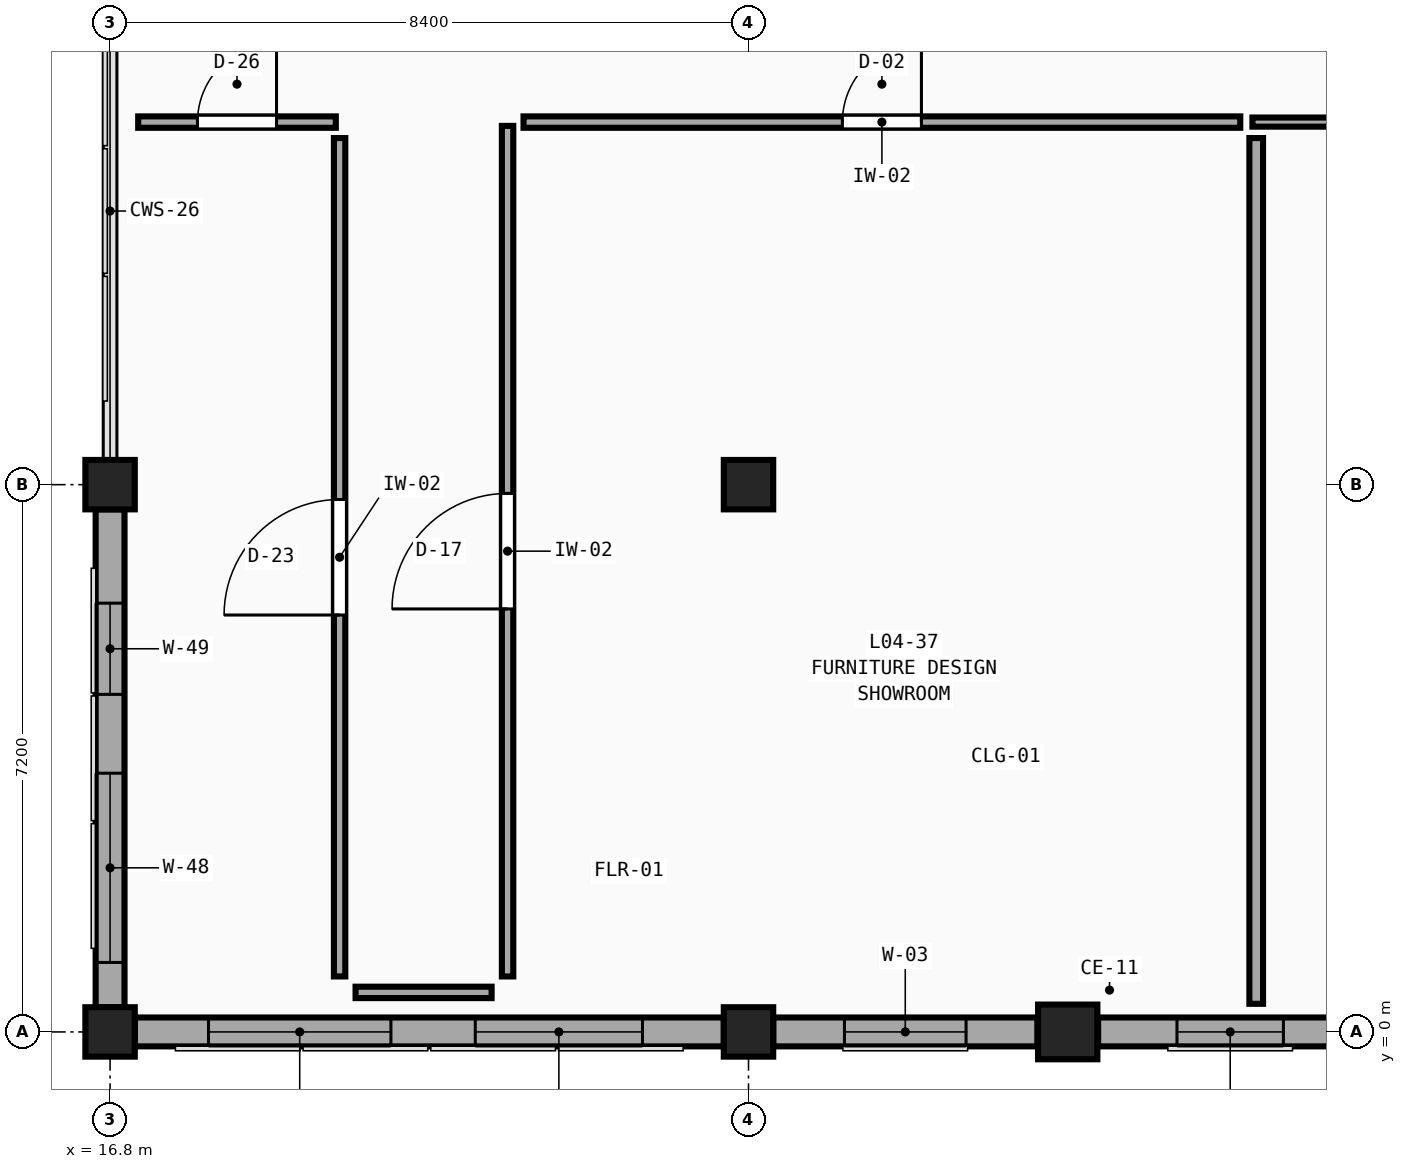
"""IFC4 building model, lengths in metres.
Left out: names, types, materials, properties, quantities, classifications, styles, units other than length and angle.
Written with IfcOpenShell. Run it as: python <this file> out.ifc"""

import sys

from ifc_helpers import new_model, si_unit, direction, frame, frame_2d, origin, origin_2d, place, context, subcontext, project, spatial, rectangle, extrude, element, fill, save


model = new_model("IFC4")
c1 = context("Model", 3, precision=1e-05, world=origin(), true_north=direction((0.0, 1.0)))
c2 = subcontext(c1, "Body", "Model", "MODEL_VIEW")
j1 = project(units=[si_unit("LENGTHUNIT", "METRE"), si_unit("PLANEANGLEUNIT", "RADIAN")], contexts=[c1])
p1 = place(None, origin())
s1 = spatial("IfcSite", under=j1, at=p1, CompositionType="ELEMENT")
p2 = place(p1, origin())
s2 = spatial("IfcBuilding", under=s1, at=p2, CompositionType="ELEMENT")
p3 = place(p2, frame((0.0, 0.0, 18.9)))
s3 = spatial("IfcBuildingStorey", under=s2, at=p3, CompositionType="ELEMENT", Elevation=18.9)
for number, where, z_axis, x_axis in (
    (1, (16.8, 0.0, 0.0), (0.0, 0.0, 1.0), (1.0, 0.0, 0.0)),
    (2, (16.8, 7.2, 0.0), (0.0, 0.0, 1.0), (1.0, 0.0, 0.0)),
    (3, (25.2, 0.0, 0.0), (0.0, 0.0, 1.0), (1.0, 0.0, 0.0)),
    (4, (25.2, 7.2, 0.0), (0.0, 0.0, 1.0), (1.0, 0.0, 0.0)),
):
    element("IfcColumn", number, at=place(p3, frame(where, z_axis=z_axis, x_axis=x_axis)), inside=s3, PredefinedType="COLUMN", context=c2, shape_type="SweptSolid", body=[
        extrude(rectangle(XDim=0.65, YDim=0.65, at=origin_2d()), origin(), (0.0, 0.0, 1.0), 4.5),
    ])
p4 = place(p3, frame((29.4, 0.0, 0.0), z_axis=(0.0, 0.0, 1.0), x_axis=(1.0, 0.0, 0.0)))
e5 = element("IfcColumn", 5, at=p4, inside=s3, PredefinedType="PILASTER", context=c2, shape_type="SweptSolid", body=[
    extrude(rectangle(XDim=0.78, YDim=0.72, at=origin_2d()), origin(), (0.0, 0.0, 1.0), 4.5),
])
p5 = place(p3, frame((24.875, 0.0, 0.0), z_axis=(0.0, 0.0, 1.0), x_axis=(-1.0, 0.0, 0.0)))
e6 = element("IfcWall", 6, at=p5, inside=s3, PredefinedType="SOLIDWALL", context=c2, shape_type="SweptSolid", body=[
    extrude(rectangle(XDim=7.75, YDim=0.38, at=frame_2d((3.875, 0.0))), origin(), (0.0, 0.0, 1.0), 3.63),
])
p6 = place(p5, frame((1.07, 0.0, 0.75)))
e7 = element("IfcOpeningElement", 7, at=p6, cuts=e6, PredefinedType="OPENING", context=c2, shape_type="SweptSolid", body=[
    extrude(rectangle(XDim=2.2, YDim=2.73, at=frame_2d((1.1, 1.365))), frame((0.0, 0.21, 0.0), z_axis=(0.0, -1.0, 0.0), x_axis=(1.0, 0.0, 0.0)), (0.0, 0.0, 1.0), 0.42),
])
p7 = place(p5, frame((4.38, 0.0, 0.75)))
e8 = element("IfcOpeningElement", 8, at=p7, cuts=e6, PredefinedType="OPENING", context=c2, shape_type="SweptSolid", body=[
    extrude(rectangle(XDim=2.4, YDim=2.73, at=frame_2d((1.2, 1.365))), frame((0.0, 0.21, 0.0), z_axis=(0.0, -1.0, 0.0), x_axis=(1.0, 0.0, 0.0)), (0.0, 0.0, 1.0), 0.42),
])
p8 = place(p3, frame((16.8, 0.325, 0.0), z_axis=(0.0, 0.0, 1.0), x_axis=(0.0, 1.0, 0.0)))
e9 = element("IfcWall", 9, at=p8, inside=s3, PredefinedType="SOLIDWALL", context=c2, shape_type="SweptSolid", body=[
    extrude(rectangle(XDim=6.55, YDim=0.38, at=frame_2d((3.275, 0.0))), origin(), (0.0, 0.0, 1.0), 3.63),
])
p9 = place(p8, frame((0.589, 0.0, 0.75)))
e10 = element("IfcOpeningElement", 10, at=p9, cuts=e9, PredefinedType="OPENING", context=c2, shape_type="SweptSolid", body=[
    extrude(rectangle(XDim=2.49, YDim=2.73, at=frame_2d((1.245, 1.365))), frame((0.0, 0.21, 0.0), z_axis=(0.0, -1.0, 0.0), x_axis=(1.0, 0.0, 0.0)), (0.0, 0.0, 1.0), 0.42),
])
p10 = place(p8, frame((4.116, 0.0, 0.75)))
e11 = element("IfcOpeningElement", 11, at=p10, cuts=e9, PredefinedType="OPENING", context=c2, shape_type="SweptSolid", body=[
    extrude(rectangle(XDim=1.2, YDim=2.73, at=frame_2d((0.6, 1.365))), frame((0.0, 0.21, 0.0), z_axis=(0.0, -1.0, 0.0), x_axis=(1.0, 0.0, 0.0)), (0.0, 0.0, 1.0), 0.42),
])
p11 = place(p3, frame((33.275, 0.0, 0.0), z_axis=(0.0, 0.0, 1.0), x_axis=(-1.0, 0.0, 0.0)))
e12 = element("IfcWall", 12, at=p11, inside=s3, PredefinedType="SOLIDWALL", context=c2, shape_type="SweptSolid", body=[
    extrude(rectangle(XDim=3.475, YDim=0.38, at=frame_2d((1.737, 0.0))), origin(), (0.0, 0.0, 1.0), 3.63),
])
p12 = place(p11, frame((1.038, 0.0, 0.75)))
e13 = element("IfcOpeningElement", 13, at=p12, cuts=e12, PredefinedType="OPENING", context=c2, shape_type="SweptSolid", body=[
    extrude(rectangle(XDim=1.4, YDim=1.9, at=frame_2d((0.7, 0.95))), frame((0.0, 0.21, 0.0), z_axis=(0.0, -1.0, 0.0), x_axis=(1.0, 0.0, 0.0)), (0.0, 0.0, 1.0), 0.42),
])
p13 = place(p3, frame((29.0, 0.0, 0.0), z_axis=(0.0, 0.0, 1.0), x_axis=(-1.0, 0.0, 0.0)))
e14 = element("IfcWall", 14, at=p13, inside=s3, PredefinedType="SOLIDWALL", context=c2, shape_type="SweptSolid", body=[
    extrude(rectangle(XDim=3.475, YDim=0.38, at=frame_2d((1.738, 0.0))), origin(), (0.0, 0.0, 1.0), 3.63),
])
p14 = place(p13, frame((0.938, 0.0, 0.75)))
e15 = element("IfcOpeningElement", 15, at=p14, cuts=e14, PredefinedType="OPENING", context=c2, shape_type="SweptSolid", body=[
    extrude(rectangle(XDim=1.6, YDim=1.9, at=frame_2d((0.8, 0.95))), frame((0.0, 0.21, 0.0), z_axis=(0.0, -1.0, 0.0), x_axis=(1.0, 0.0, 0.0)), (0.0, 0.0, 1.0), 0.42),
])
p15 = place(p3, frame((22.03, 0.73, 0.0), z_axis=(0.0, 0.0, 1.0), x_axis=(0.0, 1.0, 0.0)))
e16 = element("IfcWall", 16, at=p15, inside=s3, PredefinedType="PARTITIONING", context=c2, shape_type="SweptSolid", body=[
    extrude(rectangle(XDim=11.19, YDim=0.15, at=frame_2d((5.595, 0.0))), origin(), (0.0, 0.0, 1.0), 4.18),
])
p16 = place(p15, frame((4.835, 0.0, 0.0)))
e17 = element("IfcOpeningElement", 17, at=p16, cuts=e16, PredefinedType="OPENING", context=c2, shape_type="SweptSolid", body=[
    extrude(rectangle(XDim=1.52, YDim=2.21, at=frame_2d((0.76, 1.105))), frame((0.0, 0.095, 0.0), z_axis=(0.0, -1.0, 0.0), x_axis=(1.0, 0.0, 0.0)), (0.0, 0.0, 1.0), 0.19),
])
p17 = place(p3, frame((19.82, 0.73, 0.0), z_axis=(0.0, 0.0, 1.0), x_axis=(0.0, 1.0, 0.0)))
e18 = element("IfcWall", 18, at=p17, inside=s3, PredefinedType="PARTITIONING", context=c2, shape_type="SweptSolid", body=[
    extrude(rectangle(XDim=11.03, YDim=0.15, at=frame_2d((5.515, 0.0))), origin(), (0.0, 0.0, 1.0), 4.18),
])
p18 = place(p17, frame((4.755, 0.0, 0.0)))
e19 = element("IfcOpeningElement", 19, at=p18, cuts=e18, PredefinedType="OPENING", context=c2, shape_type="SweptSolid", body=[
    extrude(rectangle(XDim=1.52, YDim=2.29, at=frame_2d((0.76, 1.145))), frame((0.0, 0.095, 0.0), z_axis=(0.0, -1.0, 0.0), x_axis=(1.0, 0.0, 0.0)), (0.0, 0.0, 1.0), 0.19),
])
p19 = place(p3, frame((22.24, 11.97, 0.0), z_axis=(0.0, 0.0, 1.0), x_axis=(1.0, 0.0, 0.0)))
e20 = element("IfcWall", 20, at=p19, inside=s3, PredefinedType="PARTITIONING", context=c2, shape_type="SweptSolid", body=[
    extrude(rectangle(XDim=9.43, YDim=0.15, at=frame_2d((4.715, 0.0))), origin(), (0.0, 0.0, 1.0), 4.18),
])
p20 = place(p19, frame((4.195, 0.0, 0.0)))
e21 = element("IfcOpeningElement", 21, at=p20, cuts=e20, PredefinedType="OPENING", context=c2, shape_type="SweptSolid", body=[
    extrude(rectangle(XDim=1.04, YDim=2.05, at=frame_2d((0.52, 1.025))), frame((0.0, 0.095, 0.0), z_axis=(0.0, -1.0, 0.0), x_axis=(1.0, 0.0, 0.0)), (0.0, 0.0, 1.0), 0.19),
])
p21 = place(p3, frame((31.83, 11.97, 0.0), z_axis=(0.0, 0.0, 1.0), x_axis=(1.0, 0.0, 0.0)))
e22 = element("IfcWall", 22, at=p21, inside=s3, PredefinedType="PARTITIONING", context=c2, shape_type="SweptSolid", body=[
    extrude(rectangle(XDim=4.74, YDim=0.12, at=frame_2d((2.37, 0.0))), origin(), (0.0, 0.0, 1.0), 4.18),
])
p22 = place(p21, frame((1.77, 0.0, 0.0)))
e23 = element("IfcOpeningElement", 23, at=p22, cuts=e22, PredefinedType="OPENING", context=c2, shape_type="SweptSolid", body=[
    extrude(rectangle(XDim=1.2, YDim=2.13, at=frame_2d((0.6, 1.065))), frame((0.0, 0.08, 0.0), z_axis=(0.0, -1.0, 0.0), x_axis=(1.0, 0.0, 0.0)), (0.0, 0.0, 1.0), 0.16),
])
p23 = place(p3, frame((17.17, 11.97, 0.0), z_axis=(0.0, 0.0, 1.0), x_axis=(1.0, 0.0, 0.0)))
e24 = element("IfcWall", 24, at=p23, inside=s3, PredefinedType="PARTITIONING", context=c2, shape_type="SweptSolid", body=[
    extrude(rectangle(XDim=2.6, YDim=0.15, at=frame_2d((1.3, 0.0))), origin(), (0.0, 0.0, 1.0), 4.18),
])
p24 = place(p23, frame((0.78, 0.0, 0.0)))
e25 = element("IfcOpeningElement", 25, at=p24, cuts=e24, PredefinedType="OPENING", context=c2, shape_type="SweptSolid", body=[
    extrude(rectangle(XDim=1.04, YDim=2.37, at=frame_2d((0.52, 1.185))), frame((0.0, 0.095, 0.0), z_axis=(0.0, -1.0, 0.0), x_axis=(1.0, 0.0, 0.0)), (0.0, 0.0, 1.0), 0.19),
])
p25 = place(p3, frame((20.03, 0.52, 0.0), z_axis=(0.0, 0.0, 1.0), x_axis=(1.0, 0.0, 0.0)))
e26 = element("IfcWall", 26, at=p25, inside=s3, PredefinedType="PARTITIONING", context=c2, shape_type="SweptSolid", body=[
    extrude(rectangle(XDim=1.79, YDim=0.15, at=frame_2d((0.895, 0.0))), origin(), (0.0, 0.0, 1.0), 3.63),
])
p26 = place(p3, frame((31.88, 0.37, 0.0), z_axis=(0.0, 0.0, 1.0), x_axis=(0.0, 1.0, 0.0)))
e27 = element("IfcWall", 27, at=p26, inside=s3, PredefinedType="PARTITIONING", context=c2, shape_type="SweptSolid", body=[
    extrude(rectangle(XDim=11.39, YDim=0.18, at=frame_2d((5.695, 0.0))), origin(), (0.0, 0.0, 1.0), 4.18),
])
p27 = place(p6, origin())
e28 = element("IfcWindow", 28, at=p27, inside=s3, PartitioningType="TRIPLE_PANEL_VERTICAL", PredefinedType="WINDOW", context=c2, shape_type="SweptSolid", body=[
    extrude(rectangle(XDim=2.2, YDim=2.73, at=frame_2d((1.1, 1.365))), frame((0.0, 0.03, 0.0), z_axis=(0.0, -1.0, 0.0), x_axis=(1.0, 0.0, 0.0)), (0.0, 0.0, 1.0), 0.06),
])
fill(e7, e28)
p28 = place(p7, origin())
e29 = element("IfcWindow", 29, at=p28, inside=s3, PartitioningType="TRIPLE_PANEL_VERTICAL", PredefinedType="WINDOW", context=c2, shape_type="SweptSolid", body=[
    extrude(rectangle(XDim=2.4, YDim=2.73, at=frame_2d((1.2, 1.365))), frame((0.0, 0.03, 0.0), z_axis=(0.0, -1.0, 0.0), x_axis=(1.0, 0.0, 0.0)), (0.0, 0.0, 1.0), 0.06),
])
fill(e8, e29)
p29 = place(p9, origin())
e30 = element("IfcWindow", 30, at=p29, inside=s3, PartitioningType="TRIPLE_PANEL_VERTICAL", PredefinedType="WINDOW", context=c2, shape_type="SweptSolid", body=[
    extrude(rectangle(XDim=2.49, YDim=2.73, at=frame_2d((1.245, 1.365))), frame((0.0, 0.03, 0.0), z_axis=(0.0, -1.0, 0.0), x_axis=(1.0, 0.0, 0.0)), (0.0, 0.0, 1.0), 0.06),
])
fill(e10, e30)
p30 = place(p10, origin())
e31 = element("IfcWindow", 31, at=p30, inside=s3, PartitioningType="SINGLE_PANEL", PredefinedType="WINDOW", context=c2, shape_type="SweptSolid", body=[
    extrude(rectangle(XDim=1.2, YDim=2.73, at=frame_2d((0.6, 1.365))), frame((0.0, 0.03, 0.0), z_axis=(0.0, -1.0, 0.0), x_axis=(1.0, 0.0, 0.0)), (0.0, 0.0, 1.0), 0.06),
])
fill(e11, e31)
p31 = place(p12, origin())
e32 = element("IfcWindow", 32, at=p31, inside=s3, PartitioningType="DOUBLE_PANEL_VERTICAL", PredefinedType="WINDOW", context=c2, shape_type="SweptSolid", body=[
    extrude(rectangle(XDim=1.4, YDim=1.9, at=frame_2d((0.7, 0.95))), frame((0.0, 0.03, 0.0), z_axis=(0.0, -1.0, 0.0), x_axis=(1.0, 0.0, 0.0)), (0.0, 0.0, 1.0), 0.06),
])
fill(e13, e32)
p32 = place(p14, origin())
e33 = element("IfcWindow", 33, at=p32, inside=s3, PartitioningType="DOUBLE_PANEL_VERTICAL", PredefinedType="WINDOW", context=c2, shape_type="SweptSolid", body=[
    extrude(rectangle(XDim=1.6, YDim=1.9, at=frame_2d((0.8, 0.95))), frame((0.0, 0.03, 0.0), z_axis=(0.0, -1.0, 0.0), x_axis=(1.0, 0.0, 0.0)), (0.0, 0.0, 1.0), 0.06),
])
fill(e15, e33)
p33 = place(p16, origin())
e34 = element("IfcDoor", 34, at=p33, inside=s3, OperationType="SINGLE_SWING_LEFT", PredefinedType="DOOR", context=c2, shape_type="SweptSolid", body=[
    extrude(rectangle(XDim=1.52, YDim=2.21, at=frame_2d((0.76, 1.105))), frame((0.0, 0.025, 0.0), z_axis=(0.0, -1.0, 0.0), x_axis=(1.0, 0.0, 0.0)), (0.0, 0.0, 1.0), 0.05),
])
fill(e17, e34)
p34 = place(p18, origin())
e35 = element("IfcDoor", 35, at=p34, inside=s3, OperationType="SINGLE_SWING_LEFT", PredefinedType="DOOR", context=c2, shape_type="SweptSolid", body=[
    extrude(rectangle(XDim=1.52, YDim=2.29, at=frame_2d((0.76, 1.145))), frame((0.0, 0.025, 0.0), z_axis=(0.0, -1.0, 0.0), x_axis=(1.0, 0.0, 0.0)), (0.0, 0.0, 1.0), 0.05),
])
fill(e19, e35)
p35 = place(p20, origin())
e36 = element("IfcDoor", 36, at=p35, inside=s3, OperationType="SINGLE_SWING_RIGHT", PredefinedType="DOOR", context=c2, shape_type="SweptSolid", body=[
    extrude(rectangle(XDim=1.04, YDim=2.05, at=frame_2d((0.52, 1.025))), frame((0.0, 0.025, 0.0), z_axis=(0.0, -1.0, 0.0), x_axis=(1.0, 0.0, 0.0)), (0.0, 0.0, 1.0), 0.05),
])
fill(e21, e36)
p36 = place(p24, origin())
e37 = element("IfcDoor", 37, at=p36, inside=s3, OperationType="SINGLE_SWING_RIGHT", PredefinedType="DOOR", context=c2, shape_type="SweptSolid", body=[
    extrude(rectangle(XDim=1.04, YDim=2.37, at=frame_2d((0.52, 1.185))), frame((0.0, 0.025, 0.0), z_axis=(0.0, -1.0, 0.0), x_axis=(1.0, 0.0, 0.0)), (0.0, 0.0, 1.0), 0.05),
])
fill(e25, e37)
save(model, sys.argv[1])
